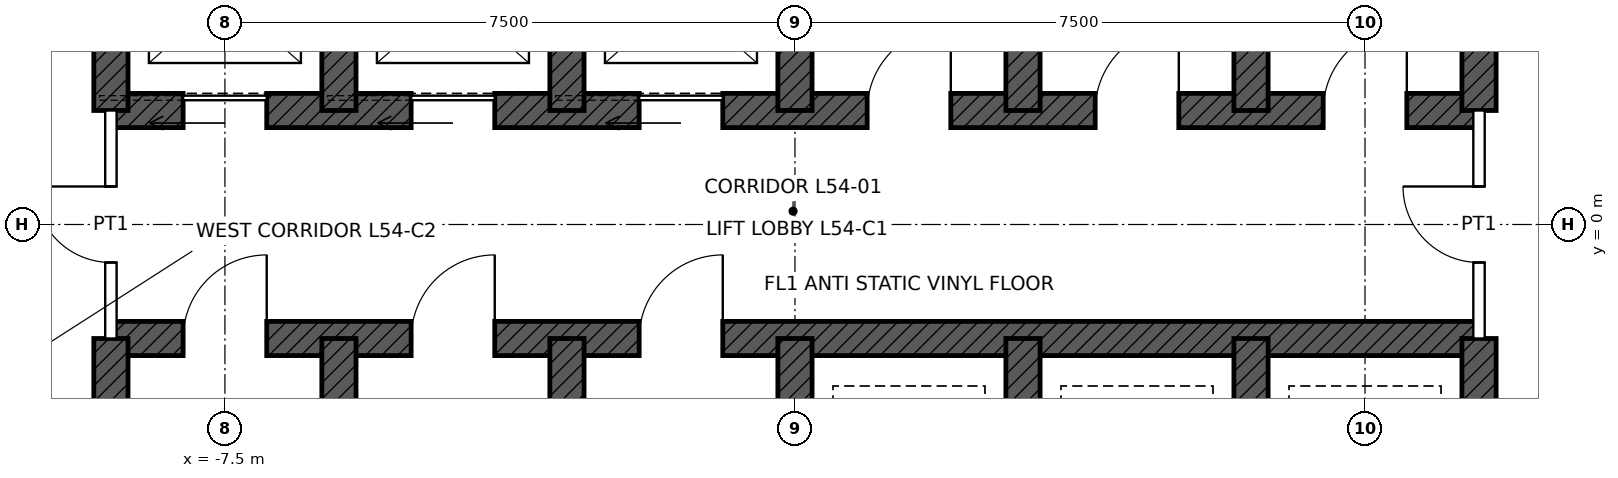
"""IFC4 building model, lengths in metres.
Left out: names, types, materials, properties, quantities, classifications, styles, units other than length and angle.
Written with IfcOpenShell. Run it as: python <this file> out.ifc"""

import sys

from ifc_helpers import new_model, si_unit, direction, frame, frame_2d, origin, place, context, subcontext, project, spatial, rectangle, extrude, element, fill, save


model = new_model("IFC4")
c1 = context("Model", 3, precision=1e-05, world=origin(), true_north=direction((0.0, 1.0)))
c2 = subcontext(c1, "Body", "Model", "MODEL_VIEW")
j1 = project(units=[si_unit("LENGTHUNIT", "METRE"), si_unit("PLANEANGLEUNIT", "RADIAN")], contexts=[c1])
p1 = place(None, origin())
s1 = spatial("IfcSite", under=j1, at=p1, CompositionType="ELEMENT")
p2 = place(p1, origin())
s2 = spatial("IfcBuilding", under=s1, at=p2, CompositionType="ELEMENT")
p3 = place(p2, frame((0.0, 0.0, 249.9)))
s3 = spatial("IfcBuildingStorey", under=s2, at=p3, CompositionType="ELEMENT", Elevation=249.9)
p4 = place(p3, frame((-9.0, 1.5, 0.0), z_axis=(0.0, 0.0, 1.0), x_axis=(1.0, 0.0, 0.0)))
e1 = element("IfcWall", 1, at=p4, inside=s3, PredefinedType="SHEAR", context=c2, shape_type="SweptSolid", body=[
    extrude(rectangle(XDim=18.0, YDim=0.45, at=frame_2d((9.0, 0.0))), origin(), (0.0, 0.0, 1.0), 4.0),
])
p5 = place(p4, frame((0.95, 0.0, 0.0)))
e2 = element("IfcOpeningElement", 2, at=p5, cuts=e1, PredefinedType="OPENING", context=c2, shape_type="SweptSolid", body=[
    extrude(rectangle(XDim=1.1, YDim=2.1, at=frame_2d((0.55, 1.05))), frame((0.0, 0.235, 0.0), z_axis=(0.0, -1.0, 0.0), x_axis=(1.0, 0.0, 0.0)), (0.0, 0.0, 1.0), 0.47),
])
p6 = place(p4, frame((3.95, 0.0, 0.0)))
e3 = element("IfcOpeningElement", 3, at=p6, cuts=e1, PredefinedType="OPENING", context=c2, shape_type="SweptSolid", body=[
    extrude(rectangle(XDim=1.1, YDim=2.1, at=frame_2d((0.55, 1.05))), frame((0.0, 0.235, 0.0), z_axis=(0.0, -1.0, 0.0), x_axis=(1.0, 0.0, 0.0)), (0.0, 0.0, 1.0), 0.47),
])
p7 = place(p4, frame((6.95, 0.0, 0.0)))
e4 = element("IfcOpeningElement", 4, at=p7, cuts=e1, PredefinedType="OPENING", context=c2, shape_type="SweptSolid", body=[
    extrude(rectangle(XDim=1.1, YDim=2.1, at=frame_2d((0.55, 1.05))), frame((0.0, 0.235, 0.0), z_axis=(0.0, -1.0, 0.0), x_axis=(1.0, 0.0, 0.0)), (0.0, 0.0, 1.0), 0.47),
])
p8 = place(p4, frame((9.95, 0.0, 0.0)))
e5 = element("IfcOpeningElement", 5, at=p8, cuts=e1, PredefinedType="OPENING", context=c2, shape_type="SweptSolid", body=[
    extrude(rectangle(XDim=1.1, YDim=2.1, at=frame_2d((0.55, 1.05))), frame((0.0, 0.235, 0.0), z_axis=(0.0, -1.0, 0.0), x_axis=(1.0, 0.0, 0.0)), (0.0, 0.0, 1.0), 0.47),
])
p9 = place(p4, frame((12.95, 0.0, 0.0)))
e6 = element("IfcOpeningElement", 6, at=p9, cuts=e1, PredefinedType="OPENING", context=c2, shape_type="SweptSolid", body=[
    extrude(rectangle(XDim=1.1, YDim=2.1, at=frame_2d((0.55, 1.05))), frame((0.0, 0.235, 0.0), z_axis=(0.0, -1.0, 0.0), x_axis=(1.0, 0.0, 0.0)), (0.0, 0.0, 1.0), 0.47),
])
p10 = place(p4, frame((15.95, 0.0, 0.0)))
e7 = element("IfcOpeningElement", 7, at=p10, cuts=e1, PredefinedType="OPENING", context=c2, shape_type="SweptSolid", body=[
    extrude(rectangle(XDim=1.1, YDim=2.1, at=frame_2d((0.55, 1.05))), frame((0.0, 0.235, 0.0), z_axis=(0.0, -1.0, 0.0), x_axis=(1.0, 0.0, 0.0)), (0.0, 0.0, 1.0), 0.47),
])
p11 = place(p3, frame((-9.0, -1.5, 0.0), z_axis=(0.0, 0.0, 1.0), x_axis=(1.0, 0.0, 0.0)))
e8 = element("IfcWall", 8, at=p11, inside=s3, PredefinedType="SHEAR", context=c2, shape_type="SweptSolid", body=[
    extrude(rectangle(XDim=18.0, YDim=0.45, at=frame_2d((9.0, 0.0))), origin(), (0.0, 0.0, 1.0), 4.0),
])
p12 = place(p11, frame((0.95, 0.0, 0.0)))
e9 = element("IfcOpeningElement", 9, at=p12, cuts=e8, PredefinedType="OPENING", context=c2, shape_type="SweptSolid", body=[
    extrude(rectangle(XDim=1.1, YDim=2.1, at=frame_2d((0.55, 1.05))), frame((0.0, 0.235, 0.0), z_axis=(0.0, -1.0, 0.0), x_axis=(1.0, 0.0, 0.0)), (0.0, 0.0, 1.0), 0.47),
])
p13 = place(p11, frame((3.95, 0.0, 0.0)))
e10 = element("IfcOpeningElement", 10, at=p13, cuts=e8, PredefinedType="OPENING", context=c2, shape_type="SweptSolid", body=[
    extrude(rectangle(XDim=1.1, YDim=2.1, at=frame_2d((0.55, 1.05))), frame((0.0, 0.235, 0.0), z_axis=(0.0, -1.0, 0.0), x_axis=(1.0, 0.0, 0.0)), (0.0, 0.0, 1.0), 0.47),
])
p14 = place(p11, frame((6.95, 0.0, 0.0)))
e11 = element("IfcOpeningElement", 11, at=p14, cuts=e8, PredefinedType="OPENING", context=c2, shape_type="SweptSolid", body=[
    extrude(rectangle(XDim=1.1, YDim=2.1, at=frame_2d((0.55, 1.05))), frame((0.0, 0.235, 0.0), z_axis=(0.0, -1.0, 0.0), x_axis=(1.0, 0.0, 0.0)), (0.0, 0.0, 1.0), 0.47),
])
for number, where, z_axis, x_axis in (
    (12, (-9.0, 1.5, 0.0), (0.0, 0.0, 1.0), (0.0, 1.0, 0.0)),
    (13, (9.0, 1.5, 0.0), (0.0, 0.0, 1.0), (0.0, 1.0, 0.0)),
    (14, (-9.0, -4.5, 0.0), (0.0, 0.0, 1.0), (0.0, 1.0, 0.0)),
    (15, (9.0, -4.5, 0.0), (0.0, 0.0, 1.0), (0.0, 1.0, 0.0)),
    (16, (-6.0, 1.5, 0.0), (0.0, 0.0, 1.0), (0.0, 1.0, 0.0)),
    (17, (-3.0, 1.5, 0.0), (0.0, 0.0, 1.0), (0.0, 1.0, 0.0)),
    (18, (0.0, 1.5, 0.0), (0.0, 0.0, 1.0), (0.0, 1.0, 0.0)),
    (19, (3.0, 1.5, 0.0), (0.0, 0.0, 1.0), (0.0, 1.0, 0.0)),
    (20, (6.0, 1.5, 0.0), (0.0, 0.0, 1.0), (0.0, 1.0, 0.0)),
    (21, (-6.0, -4.5, 0.0), (0.0, 0.0, 1.0), (0.0, 1.0, 0.0)),
    (22, (-3.0, -4.5, 0.0), (0.0, 0.0, 1.0), (0.0, 1.0, 0.0)),
    (23, (0.0, -4.5, 0.0), (0.0, 0.0, 1.0), (0.0, 1.0, 0.0)),
    (24, (3.0, -4.5, 0.0), (0.0, 0.0, 1.0), (0.0, 1.0, 0.0)),
    (25, (6.0, -4.5, 0.0), (0.0, 0.0, 1.0), (0.0, 1.0, 0.0)),
):
    element("IfcWall", number, at=place(p3, frame(where, z_axis=z_axis, x_axis=x_axis)), inside=s3, PredefinedType="SHEAR", context=c2, shape_type="SweptSolid", body=[
        extrude(rectangle(XDim=3.0, YDim=0.45, at=frame_2d((1.5, 0.0))), origin(), (0.0, 0.0, 1.0), 4.0),
    ])
p15 = place(p3, frame((-9.0, -1.5, 0.0), z_axis=(0.0, 0.0, 1.0), x_axis=(0.0, 1.0, 0.0)))
e26 = element("IfcWall", 26, at=p15, inside=s3, PredefinedType="PARTITIONING", context=c2, shape_type="SweptSolid", body=[
    extrude(rectangle(XDim=3.0, YDim=0.15, at=frame_2d((1.5, 0.0))), origin(), (0.0, 0.0, 1.0), 3.75),
])
p16 = place(p15, frame((1.0, 0.0, 0.0)))
e27 = element("IfcOpeningElement", 27, at=p16, cuts=e26, PredefinedType="OPENING", context=c2, shape_type="SweptSolid", body=[
    extrude(rectangle(XDim=1.0, YDim=2.4, at=frame_2d((0.5, 1.2))), frame((0.0, 0.085, 0.0), z_axis=(0.0, -1.0, 0.0), x_axis=(1.0, 0.0, 0.0)), (0.0, 0.0, 1.0), 0.17),
])
p17 = place(p3, frame((9.0, -1.5, 0.0), z_axis=(0.0, 0.0, 1.0), x_axis=(0.0, 1.0, 0.0)))
e28 = element("IfcWall", 28, at=p17, inside=s3, PredefinedType="PARTITIONING", context=c2, shape_type="SweptSolid", body=[
    extrude(rectangle(XDim=3.0, YDim=0.15, at=frame_2d((1.5, 0.0))), origin(), (0.0, 0.0, 1.0), 3.75),
])
p18 = place(p17, frame((1.0, 0.0, 0.0)))
e29 = element("IfcOpeningElement", 29, at=p18, cuts=e28, PredefinedType="OPENING", context=c2, shape_type="SweptSolid", body=[
    extrude(rectangle(XDim=1.0, YDim=2.4, at=frame_2d((0.5, 1.2))), frame((0.0, 0.085, 0.0), z_axis=(0.0, -1.0, 0.0), x_axis=(1.0, 0.0, 0.0)), (0.0, 0.0, 1.0), 0.17),
])
p19 = place(p5, origin())
e30 = element("IfcDoor", 30, at=p19, inside=s3, OperationType="SLIDING_TO_LEFT", PredefinedType="DOOR", context=c2, shape_type="SweptSolid", body=[
    extrude(rectangle(XDim=1.1, YDim=2.1, at=frame_2d((0.55, 1.05))), frame((0.0, 0.025, 0.0), z_axis=(0.0, -1.0, 0.0), x_axis=(1.0, 0.0, 0.0)), (0.0, 0.0, 1.0), 0.05),
])
fill(e2, e30)
p20 = place(p6, origin())
e31 = element("IfcDoor", 31, at=p20, inside=s3, OperationType="SLIDING_TO_LEFT", PredefinedType="DOOR", context=c2, shape_type="SweptSolid", body=[
    extrude(rectangle(XDim=1.1, YDim=2.1, at=frame_2d((0.55, 1.05))), frame((0.0, 0.025, 0.0), z_axis=(0.0, -1.0, 0.0), x_axis=(1.0, 0.0, 0.0)), (0.0, 0.0, 1.0), 0.05),
])
fill(e3, e31)
p21 = place(p7, origin())
e32 = element("IfcDoor", 32, at=p21, inside=s3, OperationType="SLIDING_TO_LEFT", PredefinedType="DOOR", context=c2, shape_type="SweptSolid", body=[
    extrude(rectangle(XDim=1.1, YDim=2.1, at=frame_2d((0.55, 1.05))), frame((0.0, 0.025, 0.0), z_axis=(0.0, -1.0, 0.0), x_axis=(1.0, 0.0, 0.0)), (0.0, 0.0, 1.0), 0.05),
])
fill(e4, e32)
p22 = place(p16, origin())
e33 = element("IfcDoor", 33, at=p22, inside=s3, OperationType="SINGLE_SWING_RIGHT", PredefinedType="DOOR", context=c2, shape_type="SweptSolid", body=[
    extrude(rectangle(XDim=1.0, YDim=2.4, at=frame_2d((0.5, 1.2))), frame((0.0, 0.025, 0.0), z_axis=(0.0, -1.0, 0.0), x_axis=(1.0, 0.0, 0.0)), (0.0, 0.0, 1.0), 0.05),
])
fill(e27, e33)
p23 = place(p18, origin())
e34 = element("IfcDoor", 34, at=p23, inside=s3, OperationType="SINGLE_SWING_RIGHT", PredefinedType="DOOR", context=c2, shape_type="SweptSolid", body=[
    extrude(rectangle(XDim=1.0, YDim=2.4, at=frame_2d((0.5, 1.2))), frame((0.0, 0.025, 0.0), z_axis=(0.0, -1.0, 0.0), x_axis=(1.0, 0.0, 0.0)), (0.0, 0.0, 1.0), 0.05),
])
fill(e29, e34)
p24 = place(p8, origin())
e35 = element("IfcDoor", 35, at=p24, inside=s3, OperationType="SINGLE_SWING_RIGHT", PredefinedType="DOOR", context=c2, shape_type="SweptSolid", body=[
    extrude(rectangle(XDim=1.1, YDim=2.1, at=frame_2d((0.55, 1.05))), frame((0.0, 0.025, 0.0), z_axis=(0.0, -1.0, 0.0), x_axis=(1.0, 0.0, 0.0)), (0.0, 0.0, 1.0), 0.05),
])
fill(e5, e35)
p25 = place(p9, origin())
e36 = element("IfcDoor", 36, at=p25, inside=s3, OperationType="SINGLE_SWING_RIGHT", PredefinedType="DOOR", context=c2, shape_type="SweptSolid", body=[
    extrude(rectangle(XDim=1.1, YDim=2.1, at=frame_2d((0.55, 1.05))), frame((0.0, 0.025, 0.0), z_axis=(0.0, -1.0, 0.0), x_axis=(1.0, 0.0, 0.0)), (0.0, 0.0, 1.0), 0.05),
])
fill(e6, e36)
p26 = place(p10, origin())
e37 = element("IfcDoor", 37, at=p26, inside=s3, OperationType="SINGLE_SWING_RIGHT", PredefinedType="DOOR", context=c2, shape_type="SweptSolid", body=[
    extrude(rectangle(XDim=1.1, YDim=2.1, at=frame_2d((0.55, 1.05))), frame((0.0, 0.025, 0.0), z_axis=(0.0, -1.0, 0.0), x_axis=(1.0, 0.0, 0.0)), (0.0, 0.0, 1.0), 0.05),
])
fill(e7, e37)
p27 = place(p12, origin())
e38 = element("IfcDoor", 38, at=p27, inside=s3, OperationType="SINGLE_SWING_RIGHT", PredefinedType="DOOR", context=c2, shape_type="SweptSolid", body=[
    extrude(rectangle(XDim=1.1, YDim=2.1, at=frame_2d((0.55, 1.05))), frame((0.0, 0.025, 0.0), z_axis=(0.0, -1.0, 0.0), x_axis=(1.0, 0.0, 0.0)), (0.0, 0.0, 1.0), 0.05),
])
fill(e9, e38)
p28 = place(p13, origin())
e39 = element("IfcDoor", 39, at=p28, inside=s3, OperationType="SINGLE_SWING_RIGHT", PredefinedType="DOOR", context=c2, shape_type="SweptSolid", body=[
    extrude(rectangle(XDim=1.1, YDim=2.1, at=frame_2d((0.55, 1.05))), frame((0.0, 0.025, 0.0), z_axis=(0.0, -1.0, 0.0), x_axis=(1.0, 0.0, 0.0)), (0.0, 0.0, 1.0), 0.05),
])
fill(e10, e39)
p29 = place(p14, origin())
e40 = element("IfcDoor", 40, at=p29, inside=s3, OperationType="SINGLE_SWING_RIGHT", PredefinedType="DOOR", context=c2, shape_type="SweptSolid", body=[
    extrude(rectangle(XDim=1.1, YDim=2.1, at=frame_2d((0.55, 1.05))), frame((0.0, 0.025, 0.0), z_axis=(0.0, -1.0, 0.0), x_axis=(1.0, 0.0, 0.0)), (0.0, 0.0, 1.0), 0.05),
])
fill(e11, e40)
save(model, sys.argv[1])
